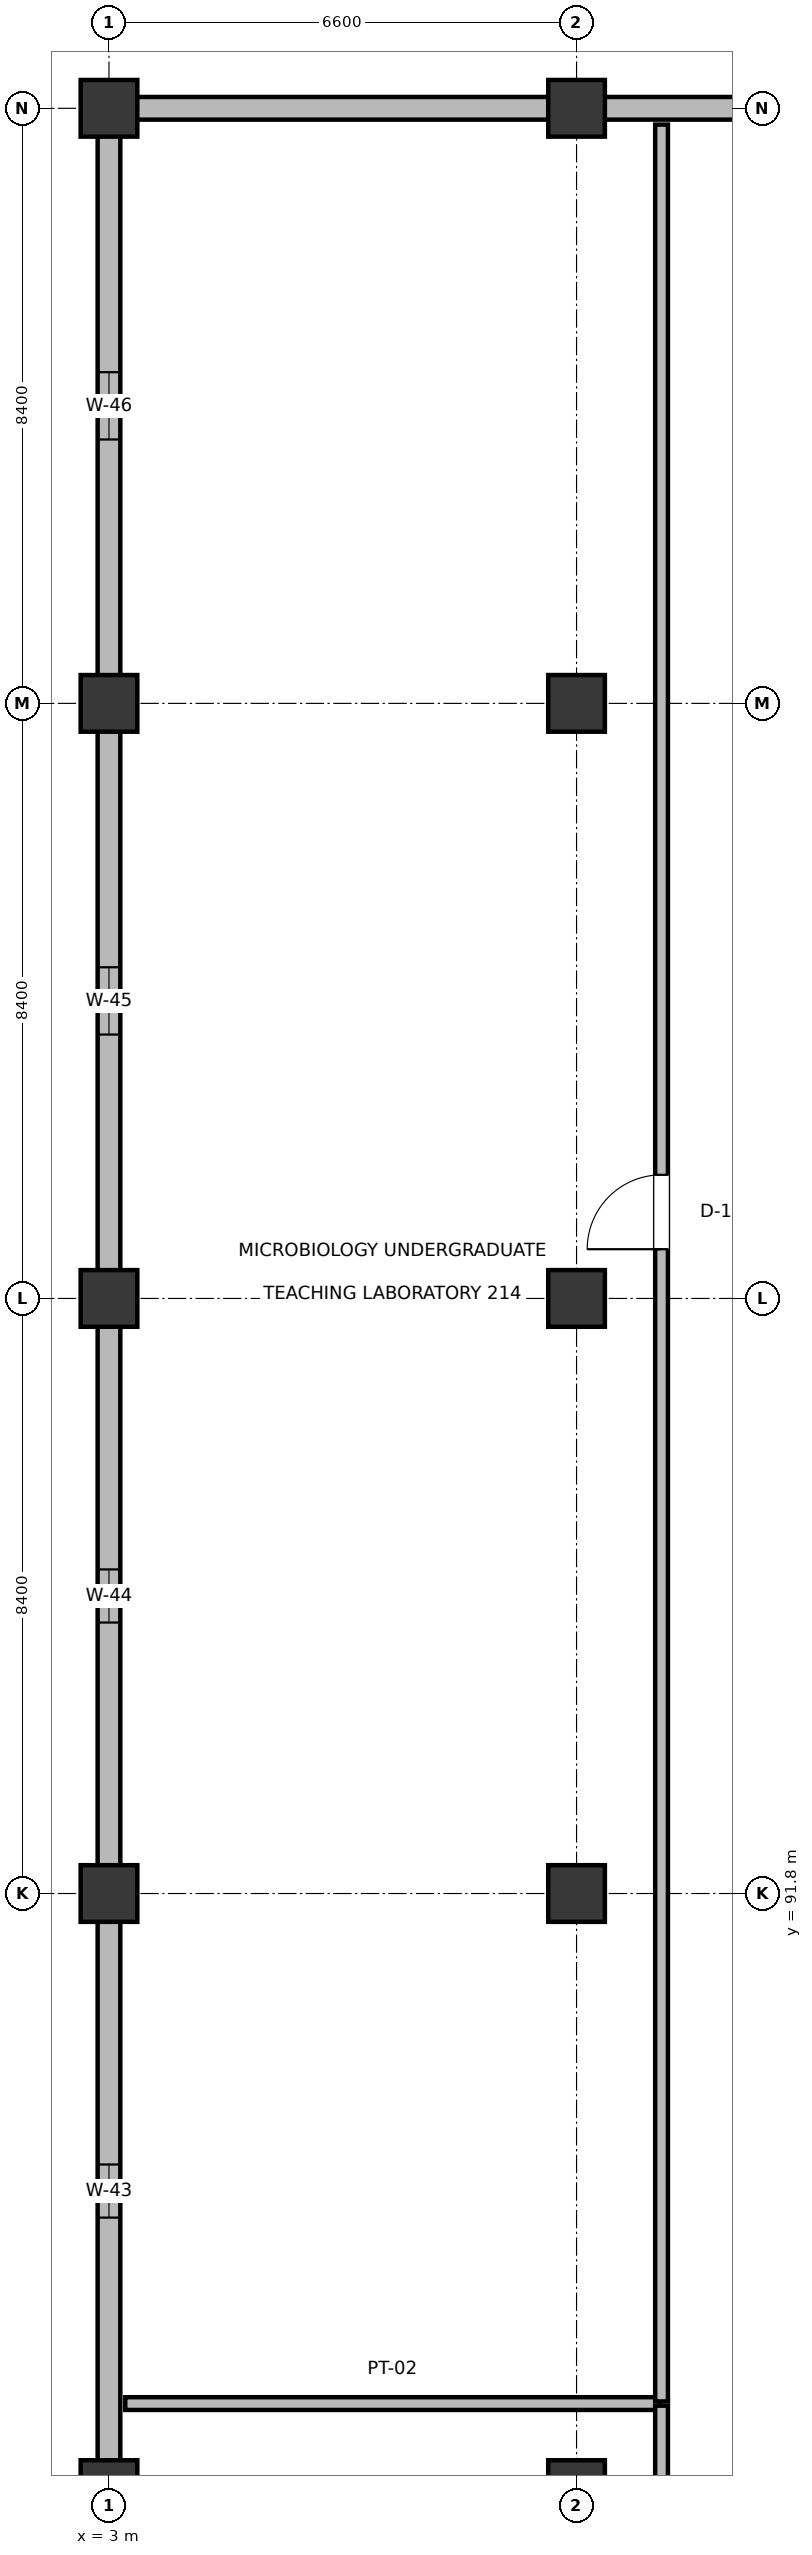
"""IFC4 building model, lengths in metres.
Left out: names, types, materials, properties, quantities, classifications, styles, units other than length and angle.
Written with IfcOpenShell. Run it as: python <this file> out.ifc"""

import sys

from ifc_helpers import new_model, si_unit, direction, frame, frame_2d, origin, origin_2d, place, context, subcontext, project, spatial, rectangle, extrude, element, fill, save


model = new_model("IFC4")
c1 = context("Model", 3, precision=1e-05, world=origin(), true_north=direction((0.0, 1.0)))
c2 = subcontext(c1, "Body", "Model", "MODEL_VIEW")
j1 = project(units=[si_unit("LENGTHUNIT", "METRE"), si_unit("PLANEANGLEUNIT", "RADIAN")], contexts=[c1])
p1 = place(None, origin())
s1 = spatial("IfcSite", under=j1, at=p1, CompositionType="ELEMENT")
p2 = place(p1, origin())
s2 = spatial("IfcBuilding", under=s1, at=p2, CompositionType="ELEMENT")
p3 = place(p2, frame((0.0, 0.0, 10.2)))
s3 = spatial("IfcBuildingStorey", under=s2, at=p3, CompositionType="ELEMENT", Elevation=10.2)
for number, where, z_axis, x_axis in (
    (1, (3.0, 83.4, 0.0), (0.0, 0.0, 1.0), (1.0, 0.0, 0.0)),
    (2, (3.0, 91.8, 0.0), (0.0, 0.0, 1.0), (1.0, 0.0, 0.0)),
    (3, (3.0, 100.2, 0.0), (0.0, 0.0, 1.0), (1.0, 0.0, 0.0)),
    (4, (3.0, 108.6, 0.0), (0.0, 0.0, 1.0), (1.0, 0.0, 0.0)),
    (5, (3.0, 117.0, 0.0), (0.0, 0.0, 1.0), (1.0, 0.0, 0.0)),
    (6, (9.6, 83.4, 0.0), (0.0, 0.0, 1.0), (1.0, 0.0, 0.0)),
    (7, (9.6, 91.8, 0.0), (0.0, 0.0, 1.0), (1.0, 0.0, 0.0)),
    (8, (9.6, 100.2, 0.0), (0.0, 0.0, 1.0), (1.0, 0.0, 0.0)),
    (9, (9.6, 108.6, 0.0), (0.0, 0.0, 1.0), (1.0, 0.0, 0.0)),
    (10, (9.6, 117.0, 0.0), (0.0, 0.0, 1.0), (1.0, 0.0, 0.0)),
):
    element("IfcColumn", number, at=place(p3, frame(where, z_axis=z_axis, x_axis=x_axis)), inside=s3, PredefinedType="COLUMN", context=c2, shape_type="SweptSolid", body=[
        extrude(rectangle(XDim=0.8, YDim=0.8, at=origin_2d()), origin(), (0.0, 0.0, 1.0), 4.8),
    ])
p4 = place(p3, frame((3.0, 83.785, 0.0), z_axis=(0.0, 0.0, 1.0), x_axis=(0.0, 1.0, 0.0)))
e11 = element("IfcWall", 11, at=p4, inside=s3, PredefinedType="SOLIDWALL", context=c2, shape_type="SweptSolid", body=[
    extrude(rectangle(XDim=7.63, YDim=0.32, at=frame_2d((3.815, 0.0))), origin(), (0.0, 0.0, 1.0), 3.775),
])
p5 = place(p4, frame((3.44, 0.0, 0.9)))
e12 = element("IfcOpeningElement", 12, at=p5, cuts=e11, PredefinedType="OPENING", context=c2, shape_type="SweptSolid", body=[
    extrude(rectangle(XDim=0.75, YDim=1.55, at=frame_2d((0.375, 0.775))), frame((0.0, 0.17, 0.0), z_axis=(0.0, -1.0, 0.0), x_axis=(1.0, 0.0, 0.0)), (0.0, 0.0, 1.0), 0.34),
])
p6 = place(p3, frame((3.0, 92.185, 0.0), z_axis=(0.0, 0.0, 1.0), x_axis=(0.0, 1.0, 0.0)))
e13 = element("IfcWall", 13, at=p6, inside=s3, PredefinedType="SOLIDWALL", context=c2, shape_type="SweptSolid", body=[
    extrude(rectangle(XDim=7.63, YDim=0.32, at=frame_2d((3.815, 0.0))), origin(), (0.0, 0.0, 1.0), 3.775),
])
p7 = place(p6, frame((3.44, 0.0, 0.9)))
e14 = element("IfcOpeningElement", 14, at=p7, cuts=e13, PredefinedType="OPENING", context=c2, shape_type="SweptSolid", body=[
    extrude(rectangle(XDim=0.75, YDim=1.75, at=frame_2d((0.375, 0.875))), frame((0.0, 0.17, 0.0), z_axis=(0.0, -1.0, 0.0), x_axis=(1.0, 0.0, 0.0)), (0.0, 0.0, 1.0), 0.34),
])
p8 = place(p3, frame((3.0, 100.585, 0.0), z_axis=(0.0, 0.0, 1.0), x_axis=(0.0, 1.0, 0.0)))
e15 = element("IfcWall", 15, at=p8, inside=s3, PredefinedType="SOLIDWALL", context=c2, shape_type="SweptSolid", body=[
    extrude(rectangle(XDim=7.63, YDim=0.32, at=frame_2d((3.815, 0.0))), origin(), (0.0, 0.0, 1.0), 3.775),
])
p9 = place(p8, frame((3.34, 0.0, 0.9)))
e16 = element("IfcOpeningElement", 16, at=p9, cuts=e15, PredefinedType="OPENING", context=c2, shape_type="SweptSolid", body=[
    extrude(rectangle(XDim=0.95, YDim=1.15, at=frame_2d((0.475, 0.575))), frame((0.0, 0.17, 0.0), z_axis=(0.0, -1.0, 0.0), x_axis=(1.0, 0.0, 0.0)), (0.0, 0.0, 1.0), 0.34),
])
p10 = place(p3, frame((3.0, 108.985, 0.0), z_axis=(0.0, 0.0, 1.0), x_axis=(0.0, 1.0, 0.0)))
e17 = element("IfcWall", 17, at=p10, inside=s3, PredefinedType="SOLIDWALL", context=c2, shape_type="SweptSolid", body=[
    extrude(rectangle(XDim=7.63, YDim=0.32, at=frame_2d((3.815, 0.0))), origin(), (0.0, 0.0, 1.0), 3.775),
])
p11 = place(p10, frame((3.34, 0.0, 0.9)))
e18 = element("IfcOpeningElement", 18, at=p11, cuts=e17, PredefinedType="OPENING", context=c2, shape_type="SweptSolid", body=[
    extrude(rectangle(XDim=0.95, YDim=1.35, at=frame_2d((0.475, 0.675))), frame((0.0, 0.17, 0.0), z_axis=(0.0, -1.0, 0.0), x_axis=(1.0, 0.0, 0.0)), (0.0, 0.0, 1.0), 0.34),
])
p12 = place(p3, frame((3.385, 117.0, 0.0), z_axis=(0.0, 0.0, 1.0), x_axis=(1.0, 0.0, 0.0)))
e19 = element("IfcWall", 19, at=p12, inside=s3, PredefinedType="SOLIDWALL", context=c2, shape_type="SweptSolid", body=[
    extrude(rectangle(XDim=19.03, YDim=0.32, at=frame_2d((9.515, 0.0))), origin(), (0.0, 0.0, 1.0), 3.775),
])
p13 = place(p12, frame((8.74, 0.0, 0.95)))
e20 = element("IfcOpeningElement", 20, at=p13, cuts=e19, PredefinedType="OPENING", context=c2, shape_type="SweptSolid", body=[
    extrude(rectangle(XDim=1.55, YDim=1.15, at=frame_2d((0.775, 0.575))), frame((0.0, 0.17, 0.0), z_axis=(0.0, -1.0, 0.0), x_axis=(1.0, 0.0, 0.0)), (0.0, 0.0, 1.0), 0.34),
])
p14 = place(p3, frame((3.23, 84.6, 0.0), z_axis=(0.0, 0.0, 1.0), x_axis=(1.0, 0.0, 0.0)))
e21 = element("IfcWall", 21, at=p14, inside=s3, PredefinedType="PARTITIONING", context=c2, shape_type="SweptSolid", body=[
    extrude(rectangle(XDim=7.54, YDim=0.18, at=frame_2d((3.77, 0.0))), origin(), (0.0, 0.0, 1.0), 3.775),
])
p15 = place(p3, frame((10.8, 55.23, 0.0), z_axis=(0.0, 0.0, 1.0), x_axis=(0.0, 1.0, 0.0)))
e22 = element("IfcWall", 22, at=p15, inside=s3, PredefinedType="PARTITIONING", context=c2, shape_type="SweptSolid", body=[
    extrude(rectangle(XDim=29.34, YDim=0.18, at=frame_2d((14.67, 0.0))), origin(), (0.0, 0.0, 1.0), 3.515),
])
p16 = place(p15, frame((14.145, 0.0, 0.0)))
e23 = element("IfcOpeningElement", 23, at=p16, cuts=e22, PredefinedType="OPENING", context=c2, shape_type="SweptSolid", body=[
    extrude(rectangle(XDim=1.05, YDim=2.2, at=frame_2d((0.525, 1.1))), frame((0.0, 0.1, 0.0), z_axis=(0.0, -1.0, 0.0), x_axis=(1.0, 0.0, 0.0)), (0.0, 0.0, 1.0), 0.2),
])
p17 = place(p3, frame((10.8, 84.63, 0.0), z_axis=(0.0, 0.0, 1.0), x_axis=(0.0, 1.0, 0.0)))
e24 = element("IfcWall", 24, at=p17, inside=s3, PredefinedType="PARTITIONING", context=c2, shape_type="SweptSolid", body=[
    extrude(rectangle(XDim=32.14, YDim=0.18, at=frame_2d((16.07, 0.0))), origin(), (0.0, 0.0, 1.0), 3.455),
])
p18 = place(p17, frame((16.265, 0.0, 0.0)))
e25 = element("IfcOpeningElement", 25, at=p18, cuts=e24, PredefinedType="OPENING", context=c2, shape_type="SweptSolid", body=[
    extrude(rectangle(XDim=1.05, YDim=2.2, at=frame_2d((0.525, 1.1))), frame((0.0, 0.1, 0.0), z_axis=(0.0, -1.0, 0.0), x_axis=(1.0, 0.0, 0.0)), (0.0, 0.0, 1.0), 0.2),
])
p19 = place(p5, origin())
e26 = element("IfcWindow", 26, at=p19, inside=s3, PartitioningType="DOUBLE_PANEL_VERTICAL", PredefinedType="WINDOW", context=c2, shape_type="SweptSolid", body=[
    extrude(rectangle(XDim=0.75, YDim=1.55, at=frame_2d((0.375, 0.775))), frame((0.0, 0.03, 0.0), z_axis=(0.0, -1.0, 0.0), x_axis=(1.0, 0.0, 0.0)), (0.0, 0.0, 1.0), 0.06),
])
fill(e12, e26)
p20 = place(p7, origin())
e27 = element("IfcWindow", 27, at=p20, inside=s3, PartitioningType="DOUBLE_PANEL_VERTICAL", PredefinedType="WINDOW", context=c2, shape_type="SweptSolid", body=[
    extrude(rectangle(XDim=0.75, YDim=1.75, at=frame_2d((0.375, 0.875))), frame((0.0, 0.03, 0.0), z_axis=(0.0, -1.0, 0.0), x_axis=(1.0, 0.0, 0.0)), (0.0, 0.0, 1.0), 0.06),
])
fill(e14, e27)
p21 = place(p9, origin())
e28 = element("IfcWindow", 28, at=p21, inside=s3, PartitioningType="DOUBLE_PANEL_VERTICAL", PredefinedType="WINDOW", context=c2, shape_type="SweptSolid", body=[
    extrude(rectangle(XDim=0.95, YDim=1.15, at=frame_2d((0.475, 0.575))), frame((0.0, 0.03, 0.0), z_axis=(0.0, -1.0, 0.0), x_axis=(1.0, 0.0, 0.0)), (0.0, 0.0, 1.0), 0.06),
])
fill(e16, e28)
p22 = place(p11, origin())
e29 = element("IfcWindow", 29, at=p22, inside=s3, PartitioningType="DOUBLE_PANEL_VERTICAL", PredefinedType="WINDOW", context=c2, shape_type="SweptSolid", body=[
    extrude(rectangle(XDim=0.95, YDim=1.35, at=frame_2d((0.475, 0.675))), frame((0.0, 0.03, 0.0), z_axis=(0.0, -1.0, 0.0), x_axis=(1.0, 0.0, 0.0)), (0.0, 0.0, 1.0), 0.06),
])
fill(e18, e29)
p23 = place(p18, origin())
e30 = element("IfcDoor", 30, at=p23, inside=s3, OperationType="SINGLE_SWING_LEFT", PredefinedType="DOOR", context=c2, shape_type="SweptSolid", body=[
    extrude(rectangle(XDim=1.05, YDim=2.2, at=frame_2d((0.525, 1.1))), frame((0.0, 0.025, 0.0), z_axis=(0.0, -1.0, 0.0), x_axis=(1.0, 0.0, 0.0)), (0.0, 0.0, 1.0), 0.05),
])
fill(e25, e30)
save(model, sys.argv[1])
